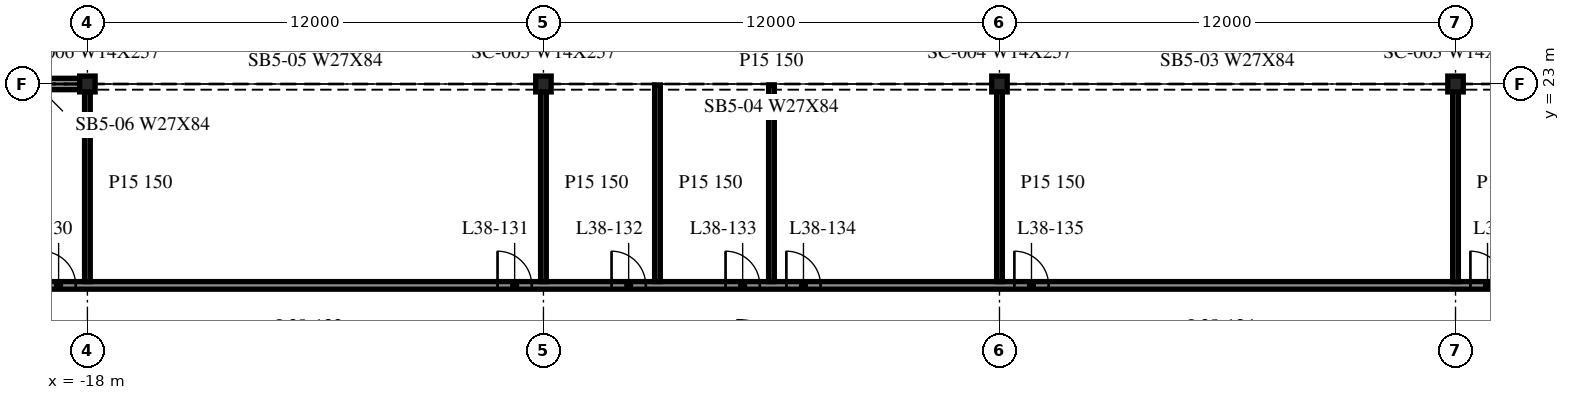
"""IFC4 building model, lengths in metres.
Left out: names, types, materials, properties, quantities, classifications, styles, units other than length and angle.
Written with IfcOpenShell. Run it as: python <this file> out.ifc"""

import sys

from ifc_helpers import new_model, si_unit, direction, frame, frame_2d, origin, origin_2d, place, context, subcontext, project, spatial, rectangle, i_section, extrude, element, fill, save


model = new_model("IFC4")
c1 = context("Model", 3, precision=1e-05, world=origin(), true_north=direction((0.0, 1.0)))
c2 = subcontext(c1, "Body", "Model", "MODEL_VIEW")
j1 = project(units=[si_unit("LENGTHUNIT", "METRE"), si_unit("PLANEANGLEUNIT", "RADIAN")], contexts=[c1])
p1 = place(None, origin())
s1 = spatial("IfcSite", under=j1, at=p1, CompositionType="ELEMENT")
p2 = place(p1, origin())
s2 = spatial("IfcBuilding", under=s1, at=p2, CompositionType="ELEMENT")
p3 = place(p2, frame((0.0, 0.0, 163.0)))
s3 = spatial("IfcBuildingStorey", under=s2, at=p3, CompositionType="ELEMENT", Elevation=163.0)
for number, where, z_axis, x_axis in (
    (1, (18.0, 23.0, -0.34), (0.0, 0.0, 1.0), (1.0, 0.0, 0.0)),
    (2, (6.0, 23.0, -0.34), (0.0, 0.0, 1.0), (1.0, 0.0, 0.0)),
    (3, (-6.0, 23.0, -0.34), (0.0, 0.0, 1.0), (1.0, 0.0, 0.0)),
    (4, (-18.0, 23.0, -0.34), (0.0, 0.0, 1.0), (1.0, 0.0, 0.0)),
):
    element("IfcColumn", number, at=place(p3, frame(where, z_axis=z_axis, x_axis=x_axis)), inside=s3, PredefinedType="COLUMN", context=c2, shape_type="SweptSolid", body=[
        extrude(i_section(OverallWidth=0.406, OverallDepth=0.417, WebThickness=0.03, FlangeThickness=0.048, at=origin_2d()), origin(), (0.0, 0.0, 1.0), 3.8),
    ])
p4 = place(p3, frame((-18.015, 23.0, 0.0), z_axis=(0.0, 0.0, 1.0), x_axis=(-1.0, 0.0, 0.0)))
e5 = element("IfcWall", 5, at=p4, inside=s3, PredefinedType="NOTDEFINED", context=c2, shape_type="SweptSolid", body=[
    extrude(rectangle(XDim=11.97, YDim=0.3, at=frame_2d((5.985, 0.0))), origin(), (0.0, 0.0, 1.0), 2.782),
])
p5 = place(p3, frame((-47.708, 17.7, 0.0), z_axis=(0.0, 0.0, 1.0), x_axis=(1.0, 0.0, 0.0)))
e6 = element("IfcWall", 6, at=p5, inside=s3, PredefinedType="PARTITIONING", context=c2, shape_type="SweptSolid", body=[
    extrude(rectangle(XDim=95.416, YDim=0.2, at=frame_2d((47.708, 0.0))), origin(), (0.0, 0.0, 1.0), 3.46),
])
p6 = place(p5, frame((4.5, 0.0, 0.0)))
e7 = element("IfcOpeningElement", 7, at=p6, cuts=e6, PredefinedType="OPENING", context=c2, shape_type="SweptSolid", body=[
    extrude(rectangle(XDim=0.9, YDim=2.1, at=frame_2d((0.45, 1.05))), frame((0.0, 0.11, 0.0), z_axis=(0.0, -1.0, 0.0), x_axis=(1.0, 0.0, 0.0)), (0.0, 0.0, 1.0), 0.22),
])
p7 = place(p5, frame((16.5, 0.0, 0.0)))
e8 = element("IfcOpeningElement", 8, at=p7, cuts=e6, PredefinedType="OPENING", context=c2, shape_type="SweptSolid", body=[
    extrude(rectangle(XDim=0.9, YDim=2.1, at=frame_2d((0.45, 1.05))), frame((0.0, 0.11, 0.0), z_axis=(0.0, -1.0, 0.0), x_axis=(1.0, 0.0, 0.0)), (0.0, 0.0, 1.0), 0.22),
])
p8 = place(p5, frame((19.5, 0.0, 0.0)))
e9 = element("IfcOpeningElement", 9, at=p8, cuts=e6, PredefinedType="OPENING", context=c2, shape_type="SweptSolid", body=[
    extrude(rectangle(XDim=0.9, YDim=2.1, at=frame_2d((0.45, 1.05))), frame((0.0, 0.11, 0.0), z_axis=(0.0, -1.0, 0.0), x_axis=(1.0, 0.0, 0.0)), (0.0, 0.0, 1.0), 0.22),
])
p9 = place(p5, frame((22.5, 0.0, 0.0)))
e10 = element("IfcOpeningElement", 10, at=p9, cuts=e6, PredefinedType="OPENING", context=c2, shape_type="SweptSolid", body=[
    extrude(rectangle(XDim=0.9, YDim=2.1, at=frame_2d((0.45, 1.05))), frame((0.0, 0.11, 0.0), z_axis=(0.0, -1.0, 0.0), x_axis=(1.0, 0.0, 0.0)), (0.0, 0.0, 1.0), 0.22),
])
p10 = place(p5, frame((28.5, 0.0, 0.0)))
e11 = element("IfcOpeningElement", 11, at=p10, cuts=e6, PredefinedType="OPENING", context=c2, shape_type="SweptSolid", body=[
    extrude(rectangle(XDim=0.9, YDim=2.1, at=frame_2d((0.45, 1.05))), frame((0.0, 0.11, 0.0), z_axis=(0.0, -1.0, 0.0), x_axis=(1.0, 0.0, 0.0)), (0.0, 0.0, 1.0), 0.22),
])
p11 = place(p5, frame((40.5, 0.0, 0.0)))
e12 = element("IfcOpeningElement", 12, at=p11, cuts=e6, PredefinedType="OPENING", context=c2, shape_type="SweptSolid", body=[
    extrude(rectangle(XDim=0.9, YDim=2.1, at=frame_2d((0.45, 1.05))), frame((0.0, 0.11, 0.0), z_axis=(0.0, -1.0, 0.0), x_axis=(1.0, 0.0, 0.0)), (0.0, 0.0, 1.0), 0.22),
])
p12 = place(p5, frame((43.5, 0.0, 0.0)))
e13 = element("IfcOpeningElement", 13, at=p12, cuts=e6, PredefinedType="OPENING", context=c2, shape_type="SweptSolid", body=[
    extrude(rectangle(XDim=0.9, YDim=2.1, at=frame_2d((0.45, 1.05))), frame((0.0, 0.11, 0.0), z_axis=(0.0, -1.0, 0.0), x_axis=(1.0, 0.0, 0.0)), (0.0, 0.0, 1.0), 0.22),
])
p13 = place(p5, frame((46.5, 0.0, 0.0)))
e14 = element("IfcOpeningElement", 14, at=p13, cuts=e6, PredefinedType="OPENING", context=c2, shape_type="SweptSolid", body=[
    extrude(rectangle(XDim=0.9, YDim=2.1, at=frame_2d((0.45, 1.05))), frame((0.0, 0.11, 0.0), z_axis=(0.0, -1.0, 0.0), x_axis=(1.0, 0.0, 0.0)), (0.0, 0.0, 1.0), 0.22),
])
p14 = place(p5, frame((48.1, 0.0, 0.0)))
e15 = element("IfcOpeningElement", 15, at=p14, cuts=e6, PredefinedType="OPENING", context=c2, shape_type="SweptSolid", body=[
    extrude(rectangle(XDim=0.9, YDim=2.1, at=frame_2d((0.45, 1.05))), frame((0.0, 0.11, 0.0), z_axis=(0.0, -1.0, 0.0), x_axis=(1.0, 0.0, 0.0)), (0.0, 0.0, 1.0), 0.22),
])
p15 = place(p5, frame((54.1, 0.0, 0.0)))
e16 = element("IfcOpeningElement", 16, at=p15, cuts=e6, PredefinedType="OPENING", context=c2, shape_type="SweptSolid", body=[
    extrude(rectangle(XDim=0.9, YDim=2.1, at=frame_2d((0.45, 1.05))), frame((0.0, 0.11, 0.0), z_axis=(0.0, -1.0, 0.0), x_axis=(1.0, 0.0, 0.0)), (0.0, 0.0, 1.0), 0.22),
])
p16 = place(p5, frame((66.1, 0.0, 0.0)))
e17 = element("IfcOpeningElement", 17, at=p16, cuts=e6, PredefinedType="OPENING", context=c2, shape_type="SweptSolid", body=[
    extrude(rectangle(XDim=0.9, YDim=2.1, at=frame_2d((0.45, 1.05))), frame((0.0, 0.11, 0.0), z_axis=(0.0, -1.0, 0.0), x_axis=(1.0, 0.0, 0.0)), (0.0, 0.0, 1.0), 0.22),
])
p17 = place(p5, frame((69.1, 0.0, 0.0)))
e18 = element("IfcOpeningElement", 18, at=p17, cuts=e6, PredefinedType="OPENING", context=c2, shape_type="SweptSolid", body=[
    extrude(rectangle(XDim=0.9, YDim=2.1, at=frame_2d((0.45, 1.05))), frame((0.0, 0.11, 0.0), z_axis=(0.0, -1.0, 0.0), x_axis=(1.0, 0.0, 0.0)), (0.0, 0.0, 1.0), 0.22),
])
p18 = place(p5, frame((72.1, 0.0, 0.0)))
e19 = element("IfcOpeningElement", 19, at=p18, cuts=e6, PredefinedType="OPENING", context=c2, shape_type="SweptSolid", body=[
    extrude(rectangle(XDim=0.9, YDim=2.1, at=frame_2d((0.45, 1.05))), frame((0.0, 0.11, 0.0), z_axis=(0.0, -1.0, 0.0), x_axis=(1.0, 0.0, 0.0)), (0.0, 0.0, 1.0), 0.22),
])
p19 = place(p5, frame((78.1, 0.0, 0.0)))
e20 = element("IfcOpeningElement", 20, at=p19, cuts=e6, PredefinedType="OPENING", context=c2, shape_type="SweptSolid", body=[
    extrude(rectangle(XDim=0.9, YDim=2.1, at=frame_2d((0.45, 1.05))), frame((0.0, 0.11, 0.0), z_axis=(0.0, -1.0, 0.0), x_axis=(1.0, 0.0, 0.0)), (0.0, 0.0, 1.0), 0.22),
])
p20 = place(p5, frame((90.1, 0.0, 0.0)))
e21 = element("IfcOpeningElement", 21, at=p20, cuts=e6, PredefinedType="OPENING", context=c2, shape_type="SweptSolid", body=[
    extrude(rectangle(XDim=0.9, YDim=2.1, at=frame_2d((0.45, 1.05))), frame((0.0, 0.11, 0.0), z_axis=(0.0, -1.0, 0.0), x_axis=(1.0, 0.0, 0.0)), (0.0, 0.0, 1.0), 0.22),
])
for number, where, z_axis, x_axis in (
    (22, (-18.0, 17.8, 0.0), (0.0, 0.0, 1.0), (0.0, 1.0, 0.0)),
    (23, (-6.0, 17.8, 0.0), (0.0, 0.0, 1.0), (0.0, 1.0, 0.0)),
    (24, (-3.0, 17.8, 0.0), (0.0, 0.0, 1.0), (0.0, 1.0, 0.0)),
    (25, (0.0, 17.8, 0.0), (0.0, 0.0, 1.0), (0.0, 1.0, 0.0)),
    (26, (6.0, 17.8, 0.0), (0.0, 0.0, 1.0), (0.0, 1.0, 0.0)),
    (27, (18.0, 17.8, 0.0), (0.0, 0.0, 1.0), (0.0, 1.0, 0.0)),
):
    element("IfcWall", number, at=place(p3, frame(where, z_axis=z_axis, x_axis=x_axis)), inside=s3, PredefinedType="PARTITIONING", context=c2, shape_type="SweptSolid", body=[
        extrude(rectangle(XDim=5.175, YDim=0.15, at=frame_2d((2.587, 0.0))), origin(), (0.0, 0.0, 1.0), 3.46),
    ])
p21 = place(p10, origin())
e28 = element("IfcDoor", 28, at=p21, inside=s3, OperationType="SINGLE_SWING_LEFT", PredefinedType="DOOR", context=c2, shape_type="SweptSolid", body=[
    extrude(rectangle(XDim=0.9, YDim=2.1, at=frame_2d((0.45, 1.05))), frame((0.0, 0.025, 0.0), z_axis=(0.0, -1.0, 0.0), x_axis=(1.0, 0.0, 0.0)), (0.0, 0.0, 1.0), 0.05),
])
fill(e11, e28)
p22 = place(p11, origin())
e29 = element("IfcDoor", 29, at=p22, inside=s3, OperationType="SINGLE_SWING_LEFT", PredefinedType="DOOR", context=c2, shape_type="SweptSolid", body=[
    extrude(rectangle(XDim=0.9, YDim=2.1, at=frame_2d((0.45, 1.05))), frame((0.0, 0.025, 0.0), z_axis=(0.0, -1.0, 0.0), x_axis=(1.0, 0.0, 0.0)), (0.0, 0.0, 1.0), 0.05),
])
fill(e12, e29)
p23 = place(p12, origin())
e30 = element("IfcDoor", 30, at=p23, inside=s3, OperationType="SINGLE_SWING_LEFT", PredefinedType="DOOR", context=c2, shape_type="SweptSolid", body=[
    extrude(rectangle(XDim=0.9, YDim=2.1, at=frame_2d((0.45, 1.05))), frame((0.0, 0.025, 0.0), z_axis=(0.0, -1.0, 0.0), x_axis=(1.0, 0.0, 0.0)), (0.0, 0.0, 1.0), 0.05),
])
fill(e13, e30)
p24 = place(p13, origin())
e31 = element("IfcDoor", 31, at=p24, inside=s3, OperationType="SINGLE_SWING_LEFT", PredefinedType="DOOR", context=c2, shape_type="SweptSolid", body=[
    extrude(rectangle(XDim=0.9, YDim=2.1, at=frame_2d((0.45, 1.05))), frame((0.0, 0.025, 0.0), z_axis=(0.0, -1.0, 0.0), x_axis=(1.0, 0.0, 0.0)), (0.0, 0.0, 1.0), 0.05),
])
fill(e14, e31)
p25 = place(p14, origin())
e32 = element("IfcDoor", 32, at=p25, inside=s3, OperationType="SINGLE_SWING_RIGHT", PredefinedType="DOOR", context=c2, shape_type="SweptSolid", body=[
    extrude(rectangle(XDim=0.9, YDim=2.1, at=frame_2d((0.45, 1.05))), frame((0.0, 0.025, 0.0), z_axis=(0.0, -1.0, 0.0), x_axis=(1.0, 0.0, 0.0)), (0.0, 0.0, 1.0), 0.05),
])
fill(e15, e32)
p26 = place(p15, origin())
e33 = element("IfcDoor", 33, at=p26, inside=s3, OperationType="SINGLE_SWING_RIGHT", PredefinedType="DOOR", context=c2, shape_type="SweptSolid", body=[
    extrude(rectangle(XDim=0.9, YDim=2.1, at=frame_2d((0.45, 1.05))), frame((0.0, 0.025, 0.0), z_axis=(0.0, -1.0, 0.0), x_axis=(1.0, 0.0, 0.0)), (0.0, 0.0, 1.0), 0.05),
])
fill(e16, e33)
p27 = place(p16, origin())
e34 = element("IfcDoor", 34, at=p27, inside=s3, OperationType="SINGLE_SWING_RIGHT", PredefinedType="DOOR", context=c2, shape_type="SweptSolid", body=[
    extrude(rectangle(XDim=0.9, YDim=2.1, at=frame_2d((0.45, 1.05))), frame((0.0, 0.025, 0.0), z_axis=(0.0, -1.0, 0.0), x_axis=(1.0, 0.0, 0.0)), (0.0, 0.0, 1.0), 0.05),
])
fill(e17, e34)
save(model, sys.argv[1])
